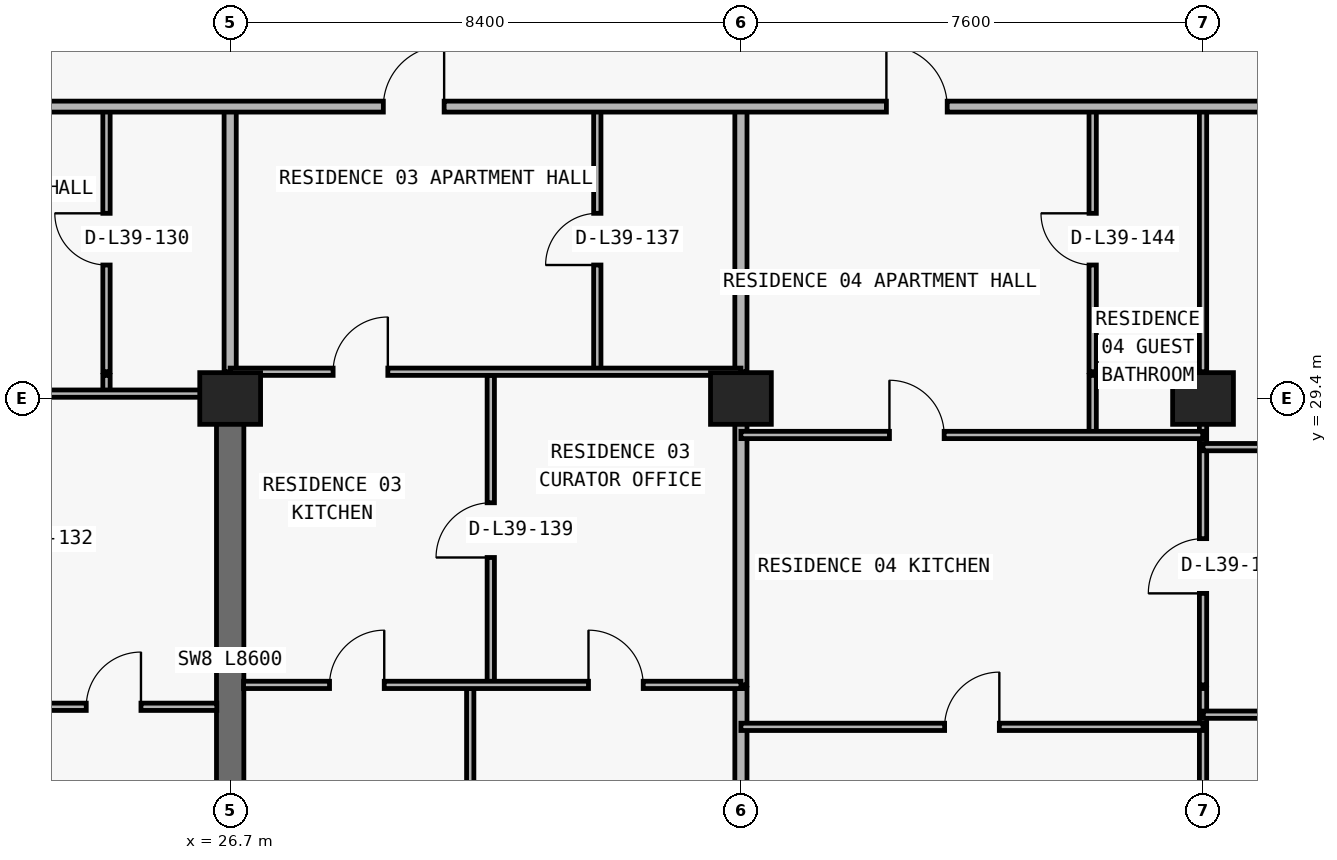
"""IFC4 building model, lengths in metres.
Left out: names, types, materials, properties, quantities, classifications, styles, units other than length and angle.
Written with IfcOpenShell. Run it as: python <this file> out.ifc"""

import sys

from ifc_helpers import new_model, si_unit, direction, frame, frame_2d, origin, origin_2d, place, context, subcontext, project, spatial, rectangle, extrude, element, fill, save


model = new_model("IFC4")
c1 = context("Model", 3, precision=1e-05, world=origin(), true_north=direction((0.0, 1.0)))
c2 = subcontext(c1, "Body", "Model", "MODEL_VIEW")
j1 = project(units=[si_unit("LENGTHUNIT", "METRE"), si_unit("PLANEANGLEUNIT", "RADIAN")], contexts=[c1])
p1 = place(None, origin())
s1 = spatial("IfcSite", under=j1, at=p1, CompositionType="ELEMENT")
p2 = place(p1, origin())
s2 = spatial("IfcBuilding", under=s1, at=p2, CompositionType="ELEMENT")
p3 = place(p2, frame((0.0, 0.0, 142.2)))
s3 = spatial("IfcBuildingStorey", under=s2, at=p3, CompositionType="ELEMENT", Elevation=142.2)
for number, where, z_axis, x_axis in (
    (1, (26.7, 29.4, 0.0), (0.0, 0.0, 1.0), (1.0, 0.0, 0.0)),
    (2, (35.1, 29.4, 0.0), (0.0, 0.0, 1.0), (1.0, 0.0, 0.0)),
    (3, (42.7, 29.4, 0.0), (0.0, 0.0, 1.0), (1.0, 0.0, 0.0)),
):
    element("IfcColumn", number, at=place(p3, frame(where, z_axis=z_axis, x_axis=x_axis)), inside=s3, PredefinedType="COLUMN", context=c2, shape_type="SweptSolid", body=[
        extrude(rectangle(XDim=1.0, YDim=0.85, at=origin_2d()), origin(), (0.0, 0.0, 1.0), 3.05),
    ])
p4 = place(p3, frame((26.7, 20.8, 0.0), z_axis=(0.0, 0.0, 1.0), x_axis=(0.0, 1.0, 0.0)))
e4 = element("IfcWall", 4, at=p4, inside=s3, PredefinedType="SHEAR", context=c2, shape_type="SweptSolid", body=[
    extrude(rectangle(XDim=8.6, YDim=0.45, at=frame_2d((4.3, 0.0))), origin(), (0.0, 0.0, 1.0), 3.05),
])
p5 = place(p3, frame((24.666, 29.48, 0.0), z_axis=(0.0, 0.0, 1.0), x_axis=(0.0, 1.0, 0.0)))
e5 = element("IfcWall", 5, at=p5, inside=s3, PredefinedType="PARTITIONING", context=c2, shape_type="SweptSolid", body=[
    extrude(rectangle(XDim=0.3, YDim=0.12, at=frame_2d((0.15, 0.0))), origin(), (0.0, 0.0, 1.0), 3.05),
])
p6 = place(p3, frame((24.666, 29.84, 0.0), z_axis=(0.0, 0.0, 1.0), x_axis=(0.0, 1.0, 0.0)))
e6 = element("IfcWall", 6, at=p6, inside=s3, PredefinedType="PARTITIONING", context=c2, shape_type="SweptSolid", body=[
    extrude(rectangle(XDim=4.36, YDim=0.12, at=frame_2d((2.18, 0.0))), origin(), (0.0, 0.0, 1.0), 3.05),
])
p7 = place(p6, frame((1.755, 0.0, 0.0)))
e7 = element("IfcOpeningElement", 7, at=p7, cuts=e6, PredefinedType="OPENING", context=c2, shape_type="SweptSolid", body=[
    extrude(rectangle(XDim=0.85, YDim=2.1, at=frame_2d((0.425, 1.05))), frame((0.0, 0.07, 0.0), z_axis=(0.0, -1.0, 0.0), x_axis=(1.0, 0.0, 0.0)), (0.0, 0.0, 1.0), 0.14),
])
p8 = place(p3, frame((26.7, 29.405, 0.0), z_axis=(0.0, 0.0, 1.0), x_axis=(0.0, 1.0, 0.0)))
e8 = element("IfcWall", 8, at=p8, inside=s3, PredefinedType="PARTITIONING", context=c2, shape_type="SweptSolid", body=[
    extrude(rectangle(XDim=0.375, YDim=0.2, at=frame_2d((0.188, 0.0))), origin(), (0.0, 0.0, 1.0), 3.05),
])
p9 = place(p3, frame((26.7, 29.84, 0.0), z_axis=(0.0, 0.0, 1.0), x_axis=(0.0, 1.0, 0.0)))
e9 = element("IfcWall", 9, at=p9, inside=s3, PredefinedType="PARTITIONING", context=c2, shape_type="SweptSolid", body=[
    extrude(rectangle(XDim=4.36, YDim=0.2, at=frame_2d((2.18, 0.0))), origin(), (0.0, 0.0, 1.0), 2.335),
])
p10 = place(p3, frame((30.648, 8.84, 0.0), z_axis=(0.0, 0.0, 1.0), x_axis=(0.0, 1.0, 0.0)))
e10 = element("IfcWall", 10, at=p10, inside=s3, PredefinedType="PARTITIONING", context=c2, shape_type="SweptSolid", body=[
    extrude(rectangle(XDim=15.79, YDim=0.12, at=frame_2d((7.895, 0.0))), origin(), (0.0, 0.0, 1.0), 3.05),
])
p11 = place(p3, frame((30.986, 24.69, 0.0), z_axis=(0.0, 0.0, 1.0), x_axis=(0.0, 1.0, 0.0)))
e11 = element("IfcWall", 11, at=p11, inside=s3, PredefinedType="PARTITIONING", context=c2, shape_type="SweptSolid", body=[
    extrude(rectangle(XDim=5.09, YDim=0.12, at=frame_2d((2.545, 0.0))), origin(), (0.0, 0.0, 1.0), 2.725),
])
p12 = place(p11, frame((2.095, 0.0, 0.0)))
e12 = element("IfcOpeningElement", 12, at=p12, cuts=e11, PredefinedType="OPENING", context=c2, shape_type="SweptSolid", body=[
    extrude(rectangle(XDim=0.9, YDim=2.15, at=frame_2d((0.45, 1.075))), frame((0.0, 0.07, 0.0), z_axis=(0.0, -1.0, 0.0), x_axis=(1.0, 0.0, 0.0)), (0.0, 0.0, 1.0), 0.14),
])
p13 = place(p3, frame((32.738, 29.84, 0.0), z_axis=(0.0, 0.0, 1.0), x_axis=(0.0, 1.0, 0.0)))
e13 = element("IfcWall", 13, at=p13, inside=s3, PredefinedType="PARTITIONING", context=c2, shape_type="SweptSolid", body=[
    extrude(rectangle(XDim=4.36, YDim=0.12, at=frame_2d((2.18, 0.0))), origin(), (0.0, 0.0, 1.0), 3.05),
])
p14 = place(p13, frame((1.755, 0.0, 0.0)))
e14 = element("IfcOpeningElement", 14, at=p14, cuts=e13, PredefinedType="OPENING", context=c2, shape_type="SweptSolid", body=[
    extrude(rectangle(XDim=0.85, YDim=2.1, at=frame_2d((0.425, 1.05))), frame((0.0, 0.07, 0.0), z_axis=(0.0, -1.0, 0.0), x_axis=(1.0, 0.0, 0.0)), (0.0, 0.0, 1.0), 0.14),
])
p15 = place(p3, frame((35.1, 8.84, 0.0), z_axis=(0.0, 0.0, 1.0), x_axis=(0.0, 1.0, 0.0)))
e15 = element("IfcWall", 15, at=p15, inside=s3, PredefinedType="PARTITIONING", context=c2, shape_type="SweptSolid", body=[
    extrude(rectangle(XDim=15.79, YDim=0.2, at=frame_2d((7.895, 0.0))), origin(), (0.0, 0.0, 1.0), 2.174),
])
p16 = place(p3, frame((35.1, 24.69, 0.0), z_axis=(0.0, 0.0, 1.0), x_axis=(0.0, 1.0, 0.0)))
e16 = element("IfcWall", 16, at=p16, inside=s3, PredefinedType="PARTITIONING", context=c2, shape_type="SweptSolid", body=[
    extrude(rectangle(XDim=5.09, YDim=0.2, at=frame_2d((2.545, 0.0))), origin(), (0.0, 0.0, 1.0), 2.174),
])
p17 = place(p3, frame((35.1, 29.84, 0.0), z_axis=(0.0, 0.0, 1.0), x_axis=(0.0, 1.0, 0.0)))
e17 = element("IfcWall", 17, at=p17, inside=s3, PredefinedType="PARTITIONING", context=c2, shape_type="SweptSolid", body=[
    extrude(rectangle(XDim=4.36, YDim=0.2, at=frame_2d((2.18, 0.0))), origin(), (0.0, 0.0, 1.0), 2.174),
])
p18 = place(p3, frame((40.885, 28.8, 0.0), z_axis=(0.0, 0.0, 1.0), x_axis=(0.0, 1.0, 0.0)))
e18 = element("IfcWall", 18, at=p18, inside=s3, PredefinedType="PARTITIONING", context=c2, shape_type="SweptSolid", body=[
    extrude(rectangle(XDim=0.98, YDim=0.12, at=frame_2d((0.49, 0.0))), origin(), (0.0, 0.0, 1.0), 3.05),
])
p19 = place(p3, frame((40.885, 29.84, 0.0), z_axis=(0.0, 0.0, 1.0), x_axis=(0.0, 1.0, 0.0)))
e19 = element("IfcWall", 19, at=p19, inside=s3, PredefinedType="PARTITIONING", context=c2, shape_type="SweptSolid", body=[
    extrude(rectangle(XDim=4.36, YDim=0.12, at=frame_2d((2.18, 0.0))), origin(), (0.0, 0.0, 1.0), 3.05),
])
p20 = place(p19, frame((1.755, 0.0, 0.0)))
e20 = element("IfcOpeningElement", 20, at=p20, cuts=e19, PredefinedType="OPENING", context=c2, shape_type="SweptSolid", body=[
    extrude(rectangle(XDim=0.85, YDim=2.1, at=frame_2d((0.425, 1.05))), frame((0.0, 0.07, 0.0), z_axis=(0.0, -1.0, 0.0), x_axis=(1.0, 0.0, 0.0)), (0.0, 0.0, 1.0), 0.14),
])
p21 = place(p3, frame((42.7, 8.84, 0.0), z_axis=(0.0, 0.0, 1.0), x_axis=(0.0, 1.0, 0.0)))
e21 = element("IfcWall", 21, at=p21, inside=s3, PredefinedType="PARTITIONING", context=c2, shape_type="SweptSolid", body=[
    extrude(rectangle(XDim=15.79, YDim=0.12, at=frame_2d((7.895, 0.0))), origin(), (0.0, 0.0, 1.0), 2.174),
])
p22 = place(p3, frame((42.7, 24.69, 0.0), z_axis=(0.0, 0.0, 1.0), x_axis=(0.0, 1.0, 0.0)))
e22 = element("IfcWall", 22, at=p22, inside=s3, PredefinedType="PARTITIONING", context=c2, shape_type="SweptSolid", body=[
    extrude(rectangle(XDim=5.09, YDim=0.12, at=frame_2d((2.545, 0.0))), origin(), (0.0, 0.0, 1.0), 2.174),
])
p23 = place(p22, frame((1.505, 0.0, 0.0)))
e23 = element("IfcOpeningElement", 23, at=p23, cuts=e22, PredefinedType="OPENING", context=c2, shape_type="SweptSolid", body=[
    extrude(rectangle(XDim=0.9, YDim=2.124, at=frame_2d((0.45, 1.062))), frame((0.0, 0.07, 0.0), z_axis=(0.0, -1.0, 0.0), x_axis=(1.0, 0.0, 0.0)), (0.0, 0.0, 1.0), 0.14),
])
p24 = place(p3, frame((42.7, 29.84, 0.0), z_axis=(0.0, 0.0, 1.0), x_axis=(0.0, 1.0, 0.0)))
e24 = element("IfcWall", 24, at=p24, inside=s3, PredefinedType="PARTITIONING", context=c2, shape_type="SweptSolid", body=[
    extrude(rectangle(XDim=4.36, YDim=0.12, at=frame_2d((2.18, 0.0))), origin(), (0.0, 0.0, 1.0), 2.174),
])
p25 = place(p3, frame((35.1, 24.0, 0.0), z_axis=(0.0, 0.0, 1.0), x_axis=(1.0, 0.0, 0.0)))
e25 = element("IfcWall", 25, at=p25, inside=s3, PredefinedType="PARTITIONING", context=c2, shape_type="SweptSolid", body=[
    extrude(rectangle(XDim=7.6, YDim=0.12, at=frame_2d((3.8, 0.0))), origin(), (0.0, 0.0, 1.0), 3.05),
])
p26 = place(p25, frame((3.35, 0.0, 0.0)))
e26 = element("IfcOpeningElement", 26, at=p26, cuts=e25, PredefinedType="OPENING", context=c2, shape_type="SweptSolid", body=[
    extrude(rectangle(XDim=0.9, YDim=2.15, at=frame_2d((0.45, 1.075))), frame((0.0, 0.07, 0.0), z_axis=(0.0, -1.0, 0.0), x_axis=(1.0, 0.0, 0.0)), (0.0, 0.0, 1.0), 0.14),
])
p27 = place(p3, frame((42.705, 24.2, 0.0), z_axis=(0.0, 0.0, 1.0), x_axis=(1.0, 0.0, 0.0)))
e27 = element("IfcWall", 27, at=p27, inside=s3, PredefinedType="PARTITIONING", context=c2, shape_type="SweptSolid", body=[
    extrude(rectangle(XDim=8.175, YDim=0.12, at=frame_2d((4.087, 0.0))), origin(), (0.0, 0.0, 1.0), 3.05),
])
p28 = place(p27, frame((3.637, 0.0, 0.0)))
e28 = element("IfcOpeningElement", 28, at=p28, cuts=e27, PredefinedType="OPENING", context=c2, shape_type="SweptSolid", body=[
    extrude(rectangle(XDim=0.9, YDim=2.15, at=frame_2d((0.45, 1.075))), frame((0.0, 0.07, 0.0), z_axis=(0.0, -1.0, 0.0), x_axis=(1.0, 0.0, 0.0)), (0.0, 0.0, 1.0), 0.14),
])
p29 = place(p3, frame((18.3, 24.33, 0.0), z_axis=(0.0, 0.0, 1.0), x_axis=(1.0, 0.0, 0.0)))
e29 = element("IfcWall", 29, at=p29, inside=s3, PredefinedType="PARTITIONING", context=c2, shape_type="SweptSolid", body=[
    extrude(rectangle(XDim=8.18, YDim=0.12, at=frame_2d((4.09, 0.0))), origin(), (0.0, 0.0, 1.0), 3.05),
])
p30 = place(p29, frame((1.86, 0.0, 0.0)))
e30 = element("IfcOpeningElement", 30, at=p30, cuts=e29, PredefinedType="OPENING", context=c2, shape_type="SweptSolid", body=[
    extrude(rectangle(XDim=0.9, YDim=2.15, at=frame_2d((0.45, 1.075))), frame((0.0, 0.07, 0.0), z_axis=(0.0, -1.0, 0.0), x_axis=(1.0, 0.0, 0.0)), (0.0, 0.0, 1.0), 0.14),
])
p31 = place(p29, frame((6.033, 0.0, 0.0)))
e31 = element("IfcOpeningElement", 31, at=p31, cuts=e29, PredefinedType="OPENING", context=c2, shape_type="SweptSolid", body=[
    extrude(rectangle(XDim=0.9, YDim=2.15, at=frame_2d((0.45, 1.075))), frame((0.0, 0.07, 0.0), z_axis=(0.0, -1.0, 0.0), x_axis=(1.0, 0.0, 0.0)), (0.0, 0.0, 1.0), 0.14),
])
p32 = place(p3, frame((26.92, 24.69, 0.0), z_axis=(0.0, 0.0, 1.0), x_axis=(1.0, 0.0, 0.0)))
e32 = element("IfcWall", 32, at=p32, inside=s3, PredefinedType="PARTITIONING", context=c2, shape_type="SweptSolid", body=[
    extrude(rectangle(XDim=8.18, YDim=0.12, at=frame_2d((4.09, 0.0))), origin(), (0.0, 0.0, 1.0), 3.05),
])
p33 = place(p32, frame((1.414, 0.0, 0.0)))
e33 = element("IfcOpeningElement", 33, at=p33, cuts=e32, PredefinedType="OPENING", context=c2, shape_type="SweptSolid", body=[
    extrude(rectangle(XDim=0.9, YDim=2.15, at=frame_2d((0.45, 1.075))), frame((0.0, 0.07, 0.0), z_axis=(0.0, -1.0, 0.0), x_axis=(1.0, 0.0, 0.0)), (0.0, 0.0, 1.0), 0.14),
])
p34 = place(p32, frame((5.673, 0.0, 0.0)))
e34 = element("IfcOpeningElement", 34, at=p34, cuts=e32, PredefinedType="OPENING", context=c2, shape_type="SweptSolid", body=[
    extrude(rectangle(XDim=0.9, YDim=2.15, at=frame_2d((0.45, 1.075))), frame((0.0, 0.07, 0.0), z_axis=(0.0, -1.0, 0.0), x_axis=(1.0, 0.0, 0.0)), (0.0, 0.0, 1.0), 0.14),
])
p35 = place(p3, frame((42.7, 28.6, 0.0), z_axis=(0.0, 0.0, 1.0), x_axis=(1.0, 0.0, 0.0)))
e35 = element("IfcWall", 35, at=p35, inside=s3, PredefinedType="PARTITIONING", context=c2, shape_type="SweptSolid", body=[
    extrude(rectangle(XDim=8.18, YDim=0.12, at=frame_2d((4.09, 0.0))), origin(), (0.0, 0.0, 1.0), 3.05),
])
p36 = place(p35, frame((2.848, 0.0, 0.0)))
e36 = element("IfcOpeningElement", 36, at=p36, cuts=e35, PredefinedType="OPENING", context=c2, shape_type="SweptSolid", body=[
    extrude(rectangle(XDim=0.9, YDim=2.15, at=frame_2d((0.45, 1.075))), frame((0.0, 0.07, 0.0), z_axis=(0.0, -1.0, 0.0), x_axis=(1.0, 0.0, 0.0)), (0.0, 0.0, 1.0), 0.14),
])
p37 = place(p3, frame((35.1, 28.8, 0.0), z_axis=(0.0, 0.0, 1.0), x_axis=(1.0, 0.0, 0.0)))
e37 = element("IfcWall", 37, at=p37, inside=s3, PredefinedType="PARTITIONING", context=c2, shape_type="SweptSolid", body=[
    extrude(rectangle(XDim=7.595, YDim=0.12, at=frame_2d((3.797, 0.0))), origin(), (0.0, 0.0, 1.0), 3.05),
])
p38 = place(p37, frame((2.442, 0.0, 0.0)))
e38 = element("IfcOpeningElement", 38, at=p38, cuts=e37, PredefinedType="OPENING", context=c2, shape_type="SweptSolid", body=[
    extrude(rectangle(XDim=0.9, YDim=2.15, at=frame_2d((0.45, 1.075))), frame((0.0, 0.07, 0.0), z_axis=(0.0, -1.0, 0.0), x_axis=(1.0, 0.0, 0.0)), (0.0, 0.0, 1.0), 0.14),
])
p39 = place(p3, frame((18.3, 29.48, 0.0), z_axis=(0.0, 0.0, 1.0), x_axis=(1.0, 0.0, 0.0)))
e39 = element("IfcWall", 39, at=p39, inside=s3, PredefinedType="PARTITIONING", context=c2, shape_type="SweptSolid", body=[
    extrude(rectangle(XDim=8.18, YDim=0.12, at=frame_2d((4.09, 0.0))), origin(), (0.0, 0.0, 1.0), 2.174),
])
p40 = place(p39, frame((1.943, 0.0, 0.0)))
e40 = element("IfcOpeningElement", 40, at=p40, cuts=e39, PredefinedType="OPENING", context=c2, shape_type="SweptSolid", body=[
    extrude(rectangle(XDim=0.9, YDim=2.124, at=frame_2d((0.45, 1.062))), frame((0.0, 0.07, 0.0), z_axis=(0.0, -1.0, 0.0), x_axis=(1.0, 0.0, 0.0)), (0.0, 0.0, 1.0), 0.14),
])
p41 = place(p3, frame((26.7, 29.84, 0.0), z_axis=(0.0, 0.0, 1.0), x_axis=(1.0, 0.0, 0.0)))
e41 = element("IfcWall", 41, at=p41, inside=s3, PredefinedType="PARTITIONING", context=c2, shape_type="SweptSolid", body=[
    extrude(rectangle(XDim=8.4, YDim=0.12, at=frame_2d((4.2, 0.0))), origin(), (0.0, 0.0, 1.0), 3.05),
])
p42 = place(p41, frame((1.693, 0.0, 0.0)))
e42 = element("IfcOpeningElement", 42, at=p42, cuts=e41, PredefinedType="OPENING", context=c2, shape_type="SweptSolid", body=[
    extrude(rectangle(XDim=0.9, YDim=2.15, at=frame_2d((0.45, 1.075))), frame((0.0, 0.07, 0.0), z_axis=(0.0, -1.0, 0.0), x_axis=(1.0, 0.0, 0.0)), (0.0, 0.0, 1.0), 0.14),
])
p43 = place(p3, frame((18.3, 34.2, 0.0), z_axis=(0.0, 0.0, 1.0), x_axis=(1.0, 0.0, 0.0)))
e43 = element("IfcWall", 43, at=p43, inside=s3, PredefinedType="PARTITIONING", context=c2, shape_type="SweptSolid", body=[
    extrude(rectangle(XDim=41.2, YDim=0.18, at=frame_2d((20.6, 0.0))), origin(), (0.0, 0.0, 1.0), 3.05),
])
p44 = place(p43, frame((2.683, 0.0, 0.0)))
e44 = element("IfcOpeningElement", 44, at=p44, cuts=e43, PredefinedType="OPENING", context=c2, shape_type="SweptSolid", body=[
    extrude(rectangle(XDim=1.0, YDim=2.2, at=frame_2d((0.5, 1.1))), frame((0.0, 0.1, 0.0), z_axis=(0.0, -1.0, 0.0), x_axis=(1.0, 0.0, 0.0)), (0.0, 0.0, 1.0), 0.2),
])
p45 = place(p43, frame((10.919, 0.0, 0.0)))
e45 = element("IfcOpeningElement", 45, at=p45, cuts=e43, PredefinedType="OPENING", context=c2, shape_type="SweptSolid", body=[
    extrude(rectangle(XDim=1.0, YDim=2.2, at=frame_2d((0.5, 1.1))), frame((0.0, 0.1, 0.0), z_axis=(0.0, -1.0, 0.0), x_axis=(1.0, 0.0, 0.0)), (0.0, 0.0, 1.0), 0.2),
])
p46 = place(p43, frame((19.192, 0.0, 0.0)))
e46 = element("IfcOpeningElement", 46, at=p46, cuts=e43, PredefinedType="OPENING", context=c2, shape_type="SweptSolid", body=[
    extrude(rectangle(XDim=1.0, YDim=2.2, at=frame_2d((0.5, 1.1))), frame((0.0, 0.1, 0.0), z_axis=(0.0, -1.0, 0.0), x_axis=(1.0, 0.0, 0.0)), (0.0, 0.0, 1.0), 0.2),
])
p47 = place(p43, frame((35.546, 0.0, 0.0)))
e47 = element("IfcOpeningElement", 47, at=p47, cuts=e43, PredefinedType="OPENING", context=c2, shape_type="SweptSolid", body=[
    extrude(rectangle(XDim=1.0, YDim=2.2, at=frame_2d((0.5, 1.1))), frame((0.0, 0.1, 0.0), z_axis=(0.0, -1.0, 0.0), x_axis=(1.0, 0.0, 0.0)), (0.0, 0.0, 1.0), 0.2),
])
p48 = place(p7, origin())
e48 = element("IfcDoor", 48, at=p48, inside=s3, OperationType="SINGLE_SWING_RIGHT", PredefinedType="DOOR", context=c2, shape_type="SweptSolid", body=[
    extrude(rectangle(XDim=0.85, YDim=2.1, at=frame_2d((0.425, 1.05))), frame((0.0, 0.025, 0.0), z_axis=(0.0, -1.0, 0.0), x_axis=(1.0, 0.0, 0.0)), (0.0, 0.0, 1.0), 0.05),
])
fill(e7, e48)
p49 = place(p31, origin())
e49 = element("IfcDoor", 49, at=p49, inside=s3, OperationType="SINGLE_SWING_RIGHT", PredefinedType="DOOR", context=c2, shape_type="SweptSolid", body=[
    extrude(rectangle(XDim=0.9, YDim=2.15, at=frame_2d((0.45, 1.075))), frame((0.0, 0.025, 0.0), z_axis=(0.0, -1.0, 0.0), x_axis=(1.0, 0.0, 0.0)), (0.0, 0.0, 1.0), 0.05),
])
fill(e31, e49)
p50 = place(p45, origin())
e50 = element("IfcDoor", 50, at=p50, inside=s3, OperationType="SINGLE_SWING_RIGHT", PredefinedType="DOOR", context=c2, shape_type="SweptSolid", body=[
    extrude(rectangle(XDim=1.0, YDim=2.2, at=frame_2d((0.5, 1.1))), frame((0.0, 0.025, 0.0), z_axis=(0.0, -1.0, 0.0), x_axis=(1.0, 0.0, 0.0)), (0.0, 0.0, 1.0), 0.05),
])
fill(e45, e50)
p51 = place(p14, origin())
e51 = element("IfcDoor", 51, at=p51, inside=s3, OperationType="SINGLE_SWING_LEFT", PredefinedType="DOOR", context=c2, shape_type="SweptSolid", body=[
    extrude(rectangle(XDim=0.85, YDim=2.1, at=frame_2d((0.425, 1.05))), frame((0.0, 0.025, 0.0), z_axis=(0.0, -1.0, 0.0), x_axis=(1.0, 0.0, 0.0)), (0.0, 0.0, 1.0), 0.05),
])
fill(e14, e51)
p52 = place(p42, origin())
e52 = element("IfcDoor", 52, at=p52, inside=s3, OperationType="SINGLE_SWING_RIGHT", PredefinedType="DOOR", context=c2, shape_type="SweptSolid", body=[
    extrude(rectangle(XDim=0.9, YDim=2.15, at=frame_2d((0.45, 1.075))), frame((0.0, 0.025, 0.0), z_axis=(0.0, -1.0, 0.0), x_axis=(1.0, 0.0, 0.0)), (0.0, 0.0, 1.0), 0.05),
])
fill(e42, e52)
p53 = place(p12, origin())
e53 = element("IfcDoor", 53, at=p53, inside=s3, OperationType="SINGLE_SWING_LEFT", PredefinedType="DOOR", context=c2, shape_type="SweptSolid", body=[
    extrude(rectangle(XDim=0.9, YDim=2.15, at=frame_2d((0.45, 1.075))), frame((0.0, 0.025, 0.0), z_axis=(0.0, -1.0, 0.0), x_axis=(1.0, 0.0, 0.0)), (0.0, 0.0, 1.0), 0.05),
])
fill(e12, e53)
p54 = place(p33, origin())
e54 = element("IfcDoor", 54, at=p54, inside=s3, OperationType="SINGLE_SWING_RIGHT", PredefinedType="DOOR", context=c2, shape_type="SweptSolid", body=[
    extrude(rectangle(XDim=0.9, YDim=2.15, at=frame_2d((0.45, 1.075))), frame((0.0, 0.025, 0.0), z_axis=(0.0, -1.0, 0.0), x_axis=(1.0, 0.0, 0.0)), (0.0, 0.0, 1.0), 0.05),
])
fill(e33, e54)
p55 = place(p34, origin())
e55 = element("IfcDoor", 55, at=p55, inside=s3, OperationType="SINGLE_SWING_LEFT", PredefinedType="DOOR", context=c2, shape_type="SweptSolid", body=[
    extrude(rectangle(XDim=0.9, YDim=2.15, at=frame_2d((0.45, 1.075))), frame((0.0, 0.025, 0.0), z_axis=(0.0, -1.0, 0.0), x_axis=(1.0, 0.0, 0.0)), (0.0, 0.0, 1.0), 0.05),
])
fill(e34, e55)
p56 = place(p46, origin())
e56 = element("IfcDoor", 56, at=p56, inside=s3, OperationType="SINGLE_SWING_LEFT", PredefinedType="DOOR", context=c2, shape_type="SweptSolid", body=[
    extrude(rectangle(XDim=1.0, YDim=2.2, at=frame_2d((0.5, 1.1))), frame((0.0, 0.025, 0.0), z_axis=(0.0, -1.0, 0.0), x_axis=(1.0, 0.0, 0.0)), (0.0, 0.0, 1.0), 0.05),
])
fill(e46, e56)
p57 = place(p20, origin())
e57 = element("IfcDoor", 57, at=p57, inside=s3, OperationType="SINGLE_SWING_RIGHT", PredefinedType="DOOR", context=c2, shape_type="SweptSolid", body=[
    extrude(rectangle(XDim=0.85, YDim=2.1, at=frame_2d((0.425, 1.05))), frame((0.0, 0.025, 0.0), z_axis=(0.0, -1.0, 0.0), x_axis=(1.0, 0.0, 0.0)), (0.0, 0.0, 1.0), 0.05),
])
fill(e20, e57)
p58 = place(p38, origin())
e58 = element("IfcDoor", 58, at=p58, inside=s3, OperationType="SINGLE_SWING_LEFT", PredefinedType="DOOR", context=c2, shape_type="SweptSolid", body=[
    extrude(rectangle(XDim=0.9, YDim=2.15, at=frame_2d((0.45, 1.075))), frame((0.0, 0.025, 0.0), z_axis=(0.0, -1.0, 0.0), x_axis=(1.0, 0.0, 0.0)), (0.0, 0.0, 1.0), 0.05),
])
fill(e38, e58)
p59 = place(p26, origin())
e59 = element("IfcDoor", 59, at=p59, inside=s3, OperationType="SINGLE_SWING_RIGHT", PredefinedType="DOOR", context=c2, shape_type="SweptSolid", body=[
    extrude(rectangle(XDim=0.9, YDim=2.15, at=frame_2d((0.45, 1.075))), frame((0.0, 0.025, 0.0), z_axis=(0.0, -1.0, 0.0), x_axis=(1.0, 0.0, 0.0)), (0.0, 0.0, 1.0), 0.05),
])
fill(e26, e59)
p60 = place(p23, origin())
e60 = element("IfcDoor", 60, at=p60, inside=s3, OperationType="SINGLE_SWING_LEFT", PredefinedType="DOOR", context=c2, shape_type="SweptSolid", body=[
    extrude(rectangle(XDim=0.9, YDim=2.124, at=frame_2d((0.45, 1.062))), frame((0.0, 0.025, 0.0), z_axis=(0.0, -1.0, 0.0), x_axis=(1.0, 0.0, 0.0)), (0.0, 0.0, 1.0), 0.05),
])
fill(e23, e60)
save(model, sys.argv[1])
